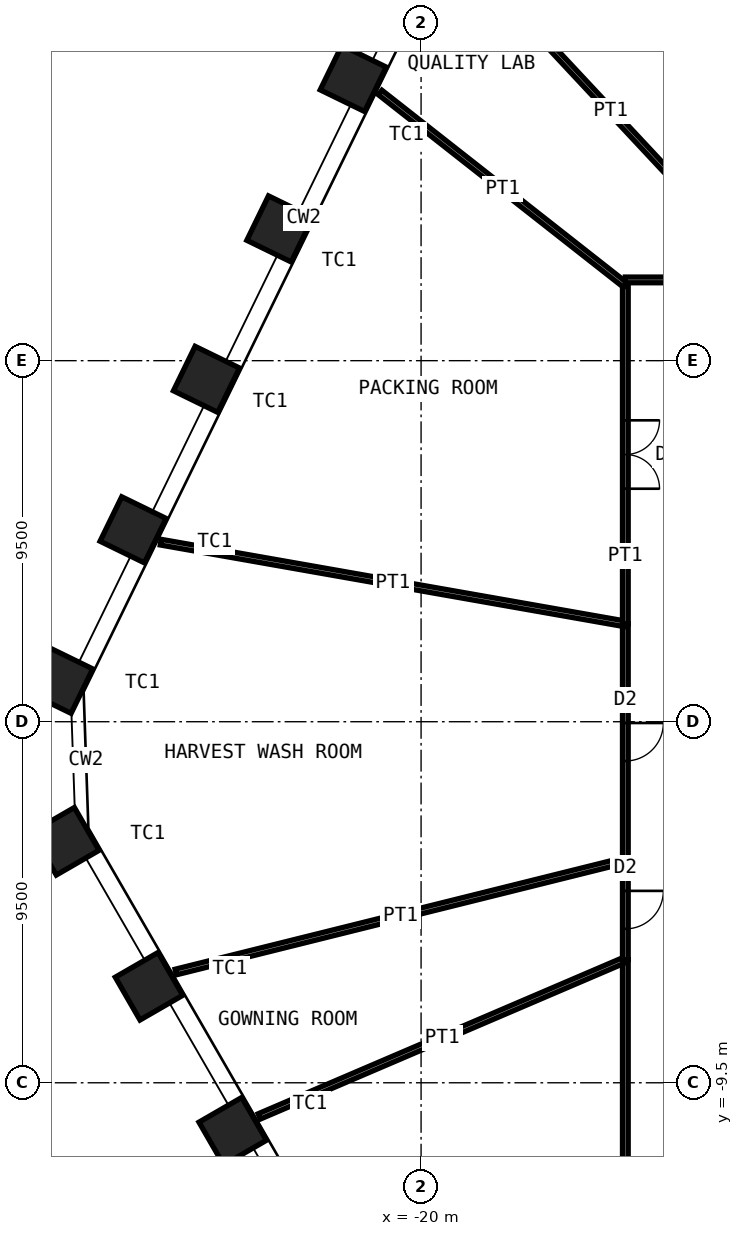
"""IFC4 building model, lengths in metres.
Left out: names, types, materials, properties, quantities, classifications, styles, units other than length and angle.
Written with IfcOpenShell. Run it as: python <this file> out.ifc"""

import sys

from ifc_helpers import new_model, si_unit, direction, frame, frame_2d, origin, origin_2d, place, context, subcontext, project, spatial, rectangle, hollow_rectangle, extrude, element, fill, save


model = new_model("IFC4")
c1 = context("Model", 3, precision=1e-05, world=origin(), true_north=direction((0.0, 1.0)))
c2 = subcontext(c1, "Body", "Model", "MODEL_VIEW")
j1 = project(units=[si_unit("LENGTHUNIT", "METRE"), si_unit("PLANEANGLEUNIT", "RADIAN")], contexts=[c1])
p1 = place(None, origin())
s1 = spatial("IfcSite", under=j1, at=p1, CompositionType="ELEMENT")
p2 = place(p1, origin())
s2 = spatial("IfcBuilding", under=s1, at=p2, CompositionType="ELEMENT")
p3 = place(p2, frame((0.0, 0.0, 42.0)))
s3 = spatial("IfcBuildingStorey", under=s2, at=p3, CompositionType="ELEMENT", Elevation=42.0)
for number, where, z_axis, x_axis in (
    (1, (-24.956, -10.775, 0.0), (0.0, 0.0, 1.0), (0.5, -0.866, 0.0)),
    (2, (-27.158, -6.96, 0.0), (0.0, 0.0, 1.0), (0.5, -0.866, 0.0)),
    (3, (-29.361, -3.146, 0.0), (0.0, 0.0, 1.0), (0.5, -0.866, 0.0)),
    (4, (-29.509, 1.09, 0.0), (0.0, 0.0, 1.0), (-0.438, -0.899, 0.0)),
    (5, (-27.578, 5.049, 0.0), (0.0, 0.0, 1.0), (-0.438, -0.899, 0.0)),
    (6, (-25.647, 9.008, 0.0), (0.0, 0.0, 1.0), (-0.438, -0.899, 0.0)),
    (7, (-23.716, 12.966, 0.0), (0.0, 0.0, 1.0), (-0.438, -0.899, 0.0)),
    (8, (-21.785, 16.925, 0.0), (0.0, 0.0, 1.0), (-0.438, -0.899, 0.0)),
):
    element("IfcColumn", number, at=place(p3, frame(where, z_axis=z_axis, x_axis=x_axis)), inside=s3, PredefinedType="COLUMN", context=c2, shape_type="SweptSolid", body=[
        extrude(hollow_rectangle(XDim=1.3, YDim=1.3, WallThickness=0.1, at=origin_2d()), origin(), (0.0, 0.0, 1.0), 5.0),
    ])
p4 = place(p3, frame((-14.625, -11.625, 0.0), z_axis=(0.0, 0.0, 1.0), x_axis=(0.0, 1.0, 0.0)))
e9 = element("IfcWall", 9, at=p4, inside=s3, PredefinedType="PARTITIONING", context=c2, shape_type="SweptSolid", body=[
    extrude(rectangle(XDim=5.364, YDim=0.15, at=frame_2d((2.682, 0.0))), origin(), (0.0, 0.0, 1.0), 4.8),
])
p5 = place(p3, frame((-24.258, -10.385, 0.0), z_axis=(0.0, 0.0, 1.0), x_axis=(0.919298009201, 0.393562155547, 0.0)))
e10 = element("IfcWall", 10, at=p5, inside=s3, PredefinedType="PARTITIONING", context=c2, shape_type="SweptSolid", body=[
    extrude(rectangle(XDim=10.479, YDim=0.15, at=frame_2d((5.239, 0.0))), origin(), (0.0, 0.0, 1.0), 3.7),
])
p6 = place(p3, frame((-14.625, -6.261, 0.0), z_axis=(0.0, 0.0, 1.0), x_axis=(0.0, 1.0, 0.0)))
e11 = element("IfcWall", 11, at=p6, inside=s3, PredefinedType="PARTITIONING", context=c2, shape_type="SweptSolid", body=[
    extrude(rectangle(XDim=2.62, YDim=0.15, at=frame_2d((1.31, 0.0))), origin(), (0.0, 0.0, 1.0), 4.8),
])
p7 = place(p6, frame((0.81, 0.0, 0.0)))
e12 = element("IfcOpeningElement", 12, at=p7, cuts=e11, PredefinedType="OPENING", context=c2, shape_type="SweptSolid", body=[
    extrude(rectangle(XDim=1.0, YDim=2.4, at=frame_2d((0.5, 1.2))), frame((0.0, 0.085, 0.0), z_axis=(0.0, -1.0, 0.0), x_axis=(1.0, 0.0, 0.0)), (0.0, 0.0, 1.0), 0.17),
])
p8 = place(p3, frame((-26.455, -6.586, 0.0), z_axis=(0.0, 0.0, 1.0), x_axis=(0.970383505188, 0.241569561118, 0.0)))
e13 = element("IfcWall", 13, at=p8, inside=s3, PredefinedType="PARTITIONING", context=c2, shape_type="SweptSolid", body=[
    extrude(rectangle(XDim=12.191, YDim=0.15, at=frame_2d((6.096, 0.0))), origin(), (0.0, 0.0, 1.0), 3.7),
])
p9 = place(p3, frame((-14.625, -3.641, 0.0), z_axis=(0.0, 0.0, 1.0), x_axis=(0.0, 1.0, 0.0)))
e14 = element("IfcWall", 14, at=p9, inside=s3, PredefinedType="PARTITIONING", context=c2, shape_type="SweptSolid", body=[
    extrude(rectangle(XDim=6.214, YDim=0.15, at=frame_2d((3.107, 0.0))), origin(), (0.0, 0.0, 1.0), 4.8),
])
p10 = place(p9, frame((2.607, 0.0, 0.0)))
e15 = element("IfcOpeningElement", 15, at=p10, cuts=e14, PredefinedType="OPENING", context=c2, shape_type="SweptSolid", body=[
    extrude(rectangle(XDim=1.0, YDim=2.4, at=frame_2d((0.5, 1.2))), frame((0.0, 0.085, 0.0), z_axis=(0.0, -1.0, 0.0), x_axis=(1.0, 0.0, 0.0)), (0.0, 0.0, 1.0), 0.17),
])
p11 = place(p3, frame((-26.85, 4.725, 0.0), z_axis=(0.0, 0.0, 1.0), x_axis=(0.984869569104, -0.173297235559, 0.0)))
e16 = element("IfcWall", 16, at=p11, inside=s3, PredefinedType="PARTITIONING", context=c2, shape_type="SweptSolid", body=[
    extrude(rectangle(XDim=12.413, YDim=0.15, at=frame_2d((6.207, 0.0))), origin(), (0.0, 0.0, 1.0), 3.7),
])
p12 = place(p3, frame((-14.625, 2.573, 0.0), z_axis=(0.0, 0.0, 1.0), x_axis=(0.0, 1.0, 0.0)))
e17 = element("IfcWall", 17, at=p12, inside=s3, PredefinedType="PARTITIONING", context=c2, shape_type="SweptSolid", body=[
    extrude(rectangle(XDim=8.915, YDim=0.15, at=frame_2d((4.457, 0.0))), origin(), (0.0, 0.0, 1.0), 4.8),
])
p13 = place(p12, frame((3.557, 0.0, 0.0)))
e18 = element("IfcOpeningElement", 18, at=p13, cuts=e17, PredefinedType="OPENING", context=c2, shape_type="SweptSolid", body=[
    extrude(rectangle(XDim=1.8, YDim=2.4, at=frame_2d((0.9, 1.2))), frame((0.0, 0.085, 0.0), z_axis=(0.0, -1.0, 0.0), x_axis=(1.0, 0.0, 0.0)), (0.0, 0.0, 1.0), 0.17),
])
p14 = place(p3, frame((-21.077, 16.557, 0.0), z_axis=(0.0, 0.0, 1.0), x_axis=(0.786385446389, -0.617736132752, 0.0)))
e19 = element("IfcWall", 19, at=p14, inside=s3, PredefinedType="PARTITIONING", context=c2, shape_type="SweptSolid", body=[
    extrude(rectangle(XDim=8.205, YDim=0.15, at=frame_2d((4.103, 0.0))), origin(), (0.0, 0.0, 1.0), 3.7),
])
p15 = place(p3, frame((-14.625, 11.625, 0.0), z_axis=(0.0, 0.0, 1.0), x_axis=(1.0, 0.0, 0.0)))
e20 = element("IfcWall", 20, at=p15, inside=s3, PredefinedType="PARTITIONING", context=c2, shape_type="SweptSolid", body=[
    extrude(rectangle(XDim=3.764, YDim=0.15, at=frame_2d((1.882, 0.0))), origin(), (0.0, 0.0, 1.0), 4.8),
])
p16 = place(p15, frame((1.382, 0.0, 0.0)))
e21 = element("IfcOpeningElement", 21, at=p16, cuts=e20, PredefinedType="OPENING", context=c2, shape_type="SweptSolid", body=[
    extrude(rectangle(XDim=1.0, YDim=2.4, at=frame_2d((0.5, 1.2))), frame((0.0, 0.085, 0.0), z_axis=(0.0, -1.0, 0.0), x_axis=(1.0, 0.0, 0.0)), (0.0, 0.0, 1.0), 0.17),
])
p17 = place(p3, frame((-19.157, 20.504, 0.0), z_axis=(0.0, 0.0, 1.0), x_axis=(0.682689688298, -0.73070841619, 0.0)))
e22 = element("IfcWall", 22, at=p17, inside=s3, PredefinedType="PARTITIONING", context=c2, shape_type="SweptSolid", body=[
    extrude(rectangle(XDim=12.151, YDim=0.15, at=frame_2d((6.076, 0.0))), origin(), (0.0, 0.0, 1.0), 3.7),
])
p18 = place(p7, origin())
e23 = element("IfcDoor", 23, at=p18, inside=s3, OperationType="SINGLE_SWING_RIGHT", PredefinedType="DOOR", context=c2, shape_type="SweptSolid", body=[
    extrude(rectangle(XDim=1.0, YDim=2.4, at=frame_2d((0.5, 1.2))), frame((0.0, 0.025, 0.0), z_axis=(0.0, -1.0, 0.0), x_axis=(1.0, 0.0, 0.0)), (0.0, 0.0, 1.0), 0.05),
])
fill(e12, e23)
p19 = place(p10, origin())
e24 = element("IfcDoor", 24, at=p19, inside=s3, OperationType="SINGLE_SWING_RIGHT", PredefinedType="DOOR", context=c2, shape_type="SweptSolid", body=[
    extrude(rectangle(XDim=1.0, YDim=2.4, at=frame_2d((0.5, 1.2))), frame((0.0, 0.025, 0.0), z_axis=(0.0, -1.0, 0.0), x_axis=(1.0, 0.0, 0.0)), (0.0, 0.0, 1.0), 0.05),
])
fill(e15, e24)
p20 = place(p13, origin())
e25 = element("IfcDoor", 25, at=p20, inside=s3, OperationType="DOUBLE_DOOR_DOUBLE_SWING", PredefinedType="DOOR", context=c2, shape_type="SweptSolid", body=[
    extrude(rectangle(XDim=1.8, YDim=2.4, at=frame_2d((0.9, 1.2))), frame((0.0, 0.025, 0.0), z_axis=(0.0, -1.0, 0.0), x_axis=(1.0, 0.0, 0.0)), (0.0, 0.0, 1.0), 0.05),
])
fill(e18, e25)
save(model, sys.argv[1])
